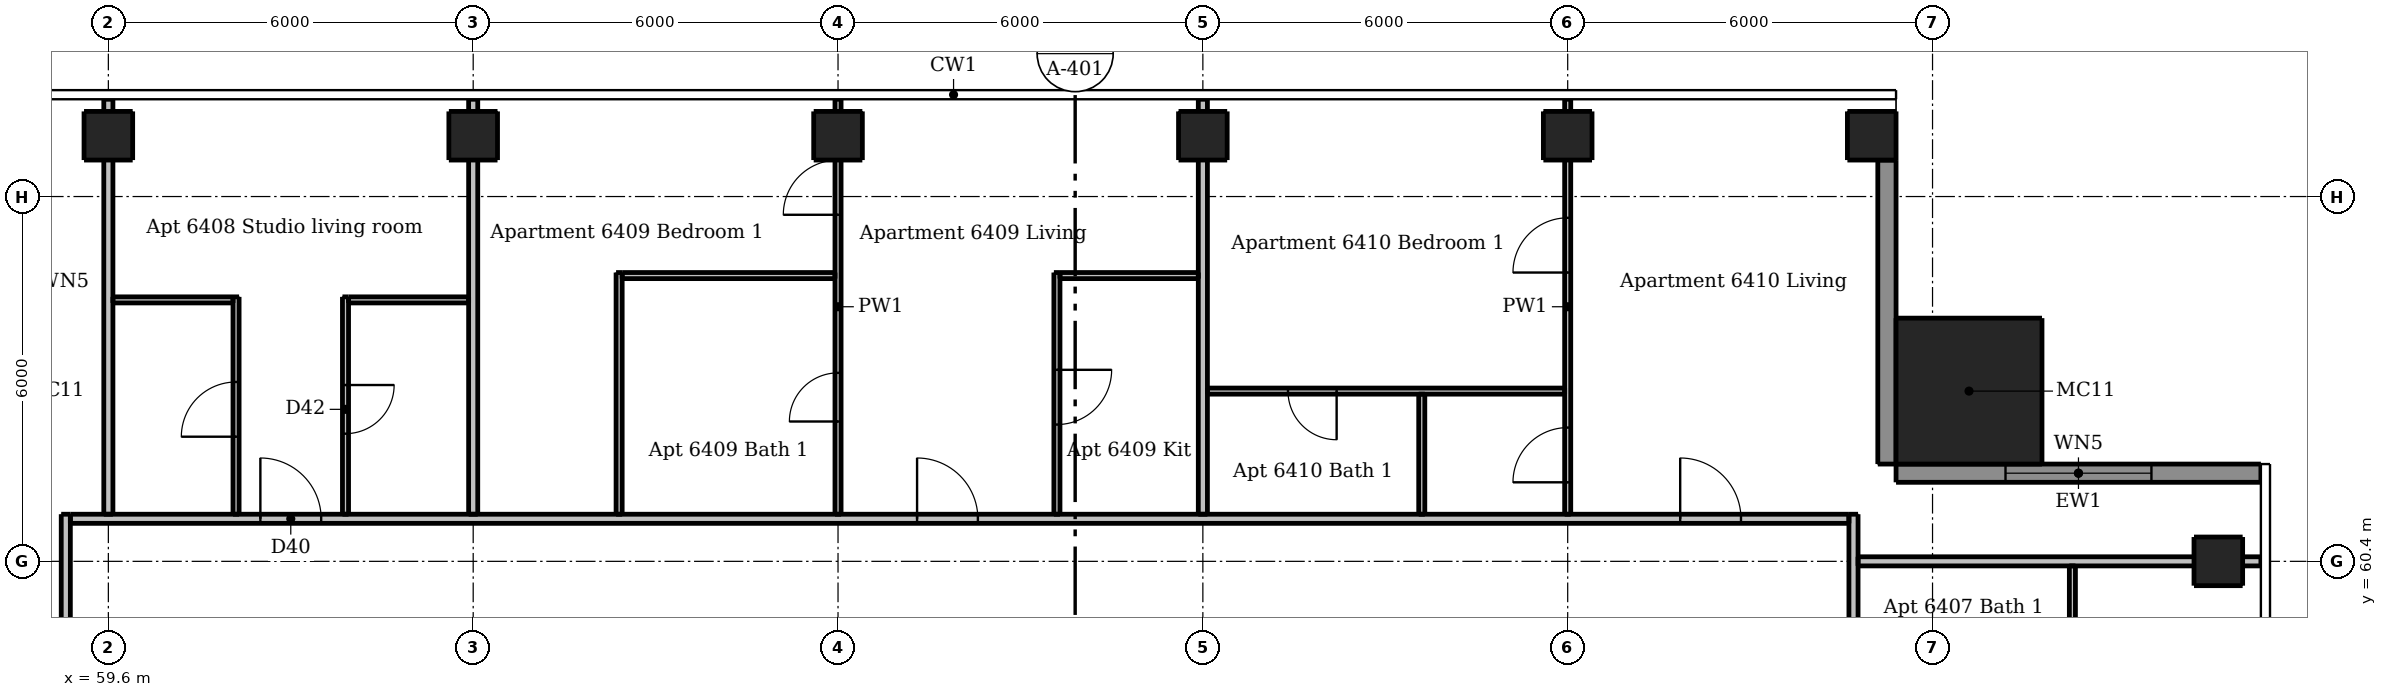
"""IFC4 building model, lengths in metres.
Left out: names, types, materials, properties, quantities, classifications, styles, units other than length and angle.
Written with IfcOpenShell. Run it as: python <this file> out.ifc"""

import sys

from ifc_helpers import new_model, si_unit, direction, frame, frame_2d, origin, origin_2d, place, context, subcontext, project, spatial, rectangle, extrude, element, fill, save


model = new_model("IFC4")
c1 = context("Model", 3, precision=1e-05, world=origin(), true_north=direction((0.0, 1.0)))
c2 = subcontext(c1, "Body", "Model", "MODEL_VIEW")
j1 = project(units=[si_unit("LENGTHUNIT", "METRE"), si_unit("PLANEANGLEUNIT", "RADIAN")], contexts=[c1])
p1 = place(None, origin())
s1 = spatial("IfcSite", under=j1, at=p1, CompositionType="ELEMENT")
p2 = place(p1, origin())
s2 = spatial("IfcBuilding", under=s1, at=p2, CompositionType="ELEMENT")
p3 = place(p2, frame((0.0, 0.0, 242.2)))
s3 = spatial("IfcBuildingStorey", under=s2, at=p3, CompositionType="ELEMENT", Elevation=242.2)
for number, where, z_axis, x_axis in (
    (1, (94.3, 60.4, 0.0), (0.0, 0.0, 1.0), (1.0, 0.0, 0.0)),
    (2, (59.6, 67.4, 0.0), (0.0, 0.0, 1.0), (1.0, 0.0, 0.0)),
    (3, (65.6, 67.4, 0.0), (0.0, 0.0, 1.0), (1.0, 0.0, 0.0)),
    (4, (71.6, 67.4, 0.0), (0.0, 0.0, 1.0), (1.0, 0.0, 0.0)),
    (5, (77.6, 67.4, 0.0), (0.0, 0.0, 1.0), (1.0, 0.0, 0.0)),
    (6, (83.6, 67.4, 0.0), (0.0, 0.0, 1.0), (1.0, 0.0, 0.0)),
    (7, (88.6, 67.4, 0.0), (0.0, 0.0, 1.0), (1.0, 0.0, 0.0)),
):
    element("IfcColumn", number, at=place(p3, frame(where, z_axis=z_axis, x_axis=x_axis)), inside=s3, PredefinedType="COLUMN", context=c2, shape_type="SweptSolid", body=[
        extrude(rectangle(XDim=0.8, YDim=0.8, at=origin_2d()), origin(), (0.0, 0.0, 1.0), 3.05),
    ])
p4 = place(p3, frame((90.2, 63.2, 0.0), z_axis=(0.0, 0.0, 1.0), x_axis=(1.0, 0.0, 0.0)))
e8 = element("IfcColumn", 8, at=p4, inside=s3, PredefinedType="COLUMN", context=c2, shape_type="SweptSolid", body=[
    extrude(rectangle(XDim=2.4, YDim=2.4, at=origin_2d()), origin(), (0.0, 0.0, 1.0), 3.3),
])
p5 = place(p3, frame((95.0, 61.85, 0.0), z_axis=(0.0, 0.0, 1.0), x_axis=(-1.0, 0.0, 0.0)))
e9 = element("IfcWall", 9, at=p5, inside=s3, PredefinedType="SOLIDWALL", context=c2, shape_type="SweptSolid", body=[
    extrude(rectangle(XDim=6.0, YDim=0.3, at=frame_2d((3.0, 0.0))), origin(), (0.0, 0.0, 1.0), 3.05),
])
p6 = place(p5, frame((1.8, 0.0, 0.15)))
e10 = element("IfcOpeningElement", 10, at=p6, cuts=e9, PredefinedType="OPENING", context=c2, shape_type="SweptSolid", body=[
    extrude(rectangle(XDim=2.4, YDim=2.1, at=frame_2d((1.2, 1.05))), frame((0.0, 0.16, 0.0), z_axis=(0.0, -1.0, 0.0), x_axis=(1.0, 0.0, 0.0)), (0.0, 0.0, 1.0), 0.32),
])
p7 = place(p3, frame((88.85, 62.0, 0.0), z_axis=(0.0, 0.0, 1.0), x_axis=(0.0, 1.0, 0.0)))
e11 = element("IfcWall", 11, at=p7, inside=s3, PredefinedType="SOLIDWALL", context=c2, shape_type="SweptSolid", body=[
    extrude(rectangle(XDim=5.0, YDim=0.3, at=frame_2d((2.5, 0.0))), origin(), (0.0, 0.0, 1.0), 3.05),
])
p8 = place(p3, frame((61.7, 61.175, 0.0), z_axis=(0.0, 0.0, 1.0), x_axis=(0.0, 1.0, 0.0)))
e12 = element("IfcWall", 12, at=p8, inside=s3, PredefinedType="PARTITIONING", context=c2, shape_type="SweptSolid", body=[
    extrude(rectangle(XDim=3.575, YDim=0.1, at=frame_2d((1.788, 0.0))), origin(), (0.0, 0.0, 1.0), 3.05),
])
p9 = place(p8, frame((1.275, 0.0, 0.0)))
e13 = element("IfcOpeningElement", 13, at=p9, cuts=e12, PredefinedType="OPENING", context=c2, shape_type="SweptSolid", body=[
    extrude(rectangle(XDim=0.9, YDim=2.1, at=frame_2d((0.45, 1.05))), frame((0.0, 0.06, 0.0), z_axis=(0.0, -1.0, 0.0), x_axis=(1.0, 0.0, 0.0)), (0.0, 0.0, 1.0), 0.12),
])
p10 = place(p3, frame((63.5, 64.75, 0.0), z_axis=(0.0, 0.0, 1.0), x_axis=(0.0, -1.0, 0.0)))
e14 = element("IfcWall", 14, at=p10, inside=s3, PredefinedType="PARTITIONING", context=c2, shape_type="SweptSolid", body=[
    extrude(rectangle(XDim=3.575, YDim=0.1, at=frame_2d((1.788, 0.0))), origin(), (0.0, 0.0, 1.0), 3.05),
])
p11 = place(p10, frame((1.45, 0.0, 0.0)))
e15 = element("IfcOpeningElement", 15, at=p11, cuts=e14, PredefinedType="OPENING", context=c2, shape_type="SweptSolid", body=[
    extrude(rectangle(XDim=0.8, YDim=2.1, at=frame_2d((0.4, 1.05))), frame((0.0, 0.06, 0.0), z_axis=(0.0, -1.0, 0.0), x_axis=(1.0, 0.0, 0.0)), (0.0, 0.0, 1.0), 0.12),
])
p12 = place(p3, frame((68.0, 61.175, 0.0), z_axis=(0.0, 0.0, 1.0), x_axis=(0.0, 1.0, 0.0)))
e16 = element("IfcWall", 16, at=p12, inside=s3, PredefinedType="PARTITIONING", context=c2, shape_type="SweptSolid", body=[
    extrude(rectangle(XDim=3.975, YDim=0.1, at=frame_2d((1.987, 0.0))), origin(), (0.0, 0.0, 1.0), 3.05),
])
p13 = place(p3, frame((71.6, 61.175, 0.0), z_axis=(0.0, 0.0, 1.0), x_axis=(0.0, 1.0, 0.0)))
e17 = element("IfcWall", 17, at=p13, inside=s3, PredefinedType="PARTITIONING", context=c2, shape_type="SweptSolid", body=[
    extrude(rectangle(XDim=6.825, YDim=0.1, at=frame_2d((3.413, 0.0))), origin(), (0.0, 0.0, 1.0), 2.516),
])
p14 = place(p13, frame((4.925, 0.0, 0.0)))
e18 = element("IfcOpeningElement", 18, at=p14, cuts=e17, PredefinedType="OPENING", context=c2, shape_type="SweptSolid", body=[
    extrude(rectangle(XDim=0.9, YDim=2.1, at=frame_2d((0.45, 1.05))), frame((0.0, 0.06, 0.0), z_axis=(0.0, -1.0, 0.0), x_axis=(1.0, 0.0, 0.0)), (0.0, 0.0, 1.0), 0.12),
])
p15 = place(p13, frame((1.525, 0.0, 0.0)))
e19 = element("IfcOpeningElement", 19, at=p15, cuts=e17, PredefinedType="OPENING", context=c2, shape_type="SweptSolid", body=[
    extrude(rectangle(XDim=0.8, YDim=2.1, at=frame_2d((0.4, 1.05))), frame((0.0, 0.06, 0.0), z_axis=(0.0, -1.0, 0.0), x_axis=(1.0, 0.0, 0.0)), (0.0, 0.0, 1.0), 0.12),
])
p16 = place(p3, frame((75.2, 65.15, 0.0), z_axis=(0.0, 0.0, 1.0), x_axis=(0.0, -1.0, 0.0)))
e20 = element("IfcWall", 20, at=p16, inside=s3, PredefinedType="PARTITIONING", context=c2, shape_type="SweptSolid", body=[
    extrude(rectangle(XDim=3.975, YDim=0.1, at=frame_2d((1.987, 0.0))), origin(), (0.0, 0.0, 1.0), 3.05),
])
p17 = place(p16, frame((1.6, 0.0, 0.0)))
e21 = element("IfcOpeningElement", 21, at=p17, cuts=e20, PredefinedType="OPENING", context=c2, shape_type="SweptSolid", body=[
    extrude(rectangle(XDim=0.9, YDim=2.1, at=frame_2d((0.45, 1.05))), frame((0.0, 0.06, 0.0), z_axis=(0.0, -1.0, 0.0), x_axis=(1.0, 0.0, 0.0)), (0.0, 0.0, 1.0), 0.12),
])
p18 = place(p3, frame((81.2, 61.175, 0.0), z_axis=(0.0, 0.0, 1.0), x_axis=(0.0, 1.0, 0.0)))
e22 = element("IfcWall", 22, at=p18, inside=s3, PredefinedType="PARTITIONING", context=c2, shape_type="SweptSolid", body=[
    extrude(rectangle(XDim=1.975, YDim=0.1, at=frame_2d((0.987, 0.0))), origin(), (0.0, 0.0, 1.0), 3.05),
])
p19 = place(p3, frame((83.6, 61.175, 0.0), z_axis=(0.0, 0.0, 1.0), x_axis=(0.0, 1.0, 0.0)))
e23 = element("IfcWall", 23, at=p19, inside=s3, PredefinedType="PARTITIONING", context=c2, shape_type="SweptSolid", body=[
    extrude(rectangle(XDim=6.825, YDim=0.1, at=frame_2d((3.413, 0.0))), origin(), (0.0, 0.0, 1.0), 2.516),
])
p20 = place(p19, frame((0.525, 0.0, 0.0)))
e24 = element("IfcOpeningElement", 24, at=p20, cuts=e23, PredefinedType="OPENING", context=c2, shape_type="SweptSolid", body=[
    extrude(rectangle(XDim=0.9, YDim=2.1, at=frame_2d((0.45, 1.05))), frame((0.0, 0.06, 0.0), z_axis=(0.0, -1.0, 0.0), x_axis=(1.0, 0.0, 0.0)), (0.0, 0.0, 1.0), 0.12),
])
p21 = place(p19, frame((3.975, 0.0, 0.0)))
e25 = element("IfcOpeningElement", 25, at=p21, cuts=e23, PredefinedType="OPENING", context=c2, shape_type="SweptSolid", body=[
    extrude(rectangle(XDim=0.9, YDim=2.1, at=frame_2d((0.45, 1.05))), frame((0.0, 0.06, 0.0), z_axis=(0.0, -1.0, 0.0), x_axis=(1.0, 0.0, 0.0)), (0.0, 0.0, 1.0), 0.12),
])
p22 = place(p3, frame((91.9, 58.25, 0.0), z_axis=(0.0, 0.0, 1.0), x_axis=(0.0, 1.0, 0.0)))
e26 = element("IfcWall", 26, at=p22, inside=s3, PredefinedType="PARTITIONING", context=c2, shape_type="SweptSolid", body=[
    extrude(rectangle(XDim=2.075, YDim=0.1, at=frame_2d((1.038, 0.0))), origin(), (0.0, 0.0, 1.0), 3.05),
])
p23 = place(p3, frame((68.05, 65.1, 0.0), z_axis=(0.0, 0.0, 1.0), x_axis=(1.0, 0.0, 0.0)))
e27 = element("IfcWall", 27, at=p23, inside=s3, PredefinedType="PARTITIONING", context=c2, shape_type="SweptSolid", body=[
    extrude(rectangle(XDim=3.5, YDim=0.1, at=frame_2d((1.75, 0.0))), origin(), (0.0, 0.0, 1.0), 3.05),
])
p24 = place(p3, frame((75.25, 65.1, 0.0), z_axis=(0.0, 0.0, 1.0), x_axis=(1.0, 0.0, 0.0)))
e28 = element("IfcWall", 28, at=p24, inside=s3, PredefinedType="PARTITIONING", context=c2, shape_type="SweptSolid", body=[
    extrude(rectangle(XDim=2.275, YDim=0.1, at=frame_2d((1.137, 0.0))), origin(), (0.0, 0.0, 1.0), 3.05),
])
for number, where, z_axis, x_axis in (
    (29, (59.675, 64.7, 0.0), (0.0, 0.0, 1.0), (1.0, 0.0, 0.0)),
    (30, (63.55, 64.7, 0.0), (0.0, 0.0, 1.0), (1.0, 0.0, 0.0)),
):
    element("IfcWall", number, at=place(p3, frame(where, z_axis=z_axis, x_axis=x_axis)), inside=s3, PredefinedType="PARTITIONING", context=c2, shape_type="SweptSolid", body=[
        extrude(rectangle(XDim=1.975, YDim=0.1, at=frame_2d((0.987, 0.0))), origin(), (0.0, 0.0, 1.0), 3.05),
    ])
p25 = place(p3, frame((83.55, 63.2, 0.0), z_axis=(0.0, 0.0, 1.0), x_axis=(-1.0, 0.0, 0.0)))
e31 = element("IfcWall", 31, at=p25, inside=s3, PredefinedType="PARTITIONING", context=c2, shape_type="SweptSolid", body=[
    extrude(rectangle(XDim=5.875, YDim=0.1, at=frame_2d((2.938, 0.0))), origin(), (0.0, 0.0, 1.0), 3.05),
])
p26 = place(p25, frame((3.75, 0.0, 0.0)))
e32 = element("IfcOpeningElement", 32, at=p26, cuts=e31, PredefinedType="OPENING", context=c2, shape_type="SweptSolid", body=[
    extrude(rectangle(XDim=0.8, YDim=2.1, at=frame_2d((0.4, 1.05))), frame((0.0, 0.06, 0.0), z_axis=(0.0, -1.0, 0.0), x_axis=(1.0, 0.0, 0.0)), (0.0, 0.0, 1.0), 0.12),
])
p27 = place(p3, frame((58.9, 30.325, 0.0), z_axis=(0.0, 0.0, 1.0), x_axis=(0.0, 1.0, 0.0)))
e33 = element("IfcWall", 33, at=p27, inside=s3, PredefinedType="PARTITIONING", context=c2, shape_type="SweptSolid", body=[
    extrude(rectangle(XDim=30.85, YDim=0.15, at=frame_2d((15.425, 0.0))), origin(), (0.0, 0.0, 1.0), 3.05),
])
p28 = place(p27, frame((2.575, 0.0, 0.0)))
e34 = element("IfcOpeningElement", 34, at=p28, cuts=e33, PredefinedType="OPENING", context=c2, shape_type="SweptSolid", body=[
    extrude(rectangle(XDim=1.0, YDim=2.1, at=frame_2d((0.5, 1.05))), frame((0.0, 0.085, 0.0), z_axis=(0.0, -1.0, 0.0), x_axis=(1.0, 0.0, 0.0)), (0.0, 0.0, 1.0), 0.17),
])
p29 = place(p27, frame((8.575, 0.0, 0.0)))
e35 = element("IfcOpeningElement", 35, at=p29, cuts=e33, PredefinedType="OPENING", context=c2, shape_type="SweptSolid", body=[
    extrude(rectangle(XDim=1.0, YDim=2.1, at=frame_2d((0.5, 1.05))), frame((0.0, 0.085, 0.0), z_axis=(0.0, -1.0, 0.0), x_axis=(1.0, 0.0, 0.0)), (0.0, 0.0, 1.0), 0.17),
])
p30 = place(p27, frame((14.575, 0.0, 0.0)))
e36 = element("IfcOpeningElement", 36, at=p30, cuts=e33, PredefinedType="OPENING", context=c2, shape_type="SweptSolid", body=[
    extrude(rectangle(XDim=1.0, YDim=2.1, at=frame_2d((0.5, 1.05))), frame((0.0, 0.085, 0.0), z_axis=(0.0, -1.0, 0.0), x_axis=(1.0, 0.0, 0.0)), (0.0, 0.0, 1.0), 0.17),
])
p31 = place(p27, frame((26.925, 0.0, 0.0)))
e37 = element("IfcOpeningElement", 37, at=p31, cuts=e33, PredefinedType="OPENING", context=c2, shape_type="SweptSolid", body=[
    extrude(rectangle(XDim=1.0, YDim=2.1, at=frame_2d((0.5, 1.05))), frame((0.0, 0.085, 0.0), z_axis=(0.0, -1.0, 0.0), x_axis=(1.0, 0.0, 0.0)), (0.0, 0.0, 1.0), 0.17),
])
p32 = place(p3, frame((59.6, 61.175, 0.0), z_axis=(0.0, 0.0, 1.0), x_axis=(0.0, 1.0, 0.0)))
e38 = element("IfcWall", 38, at=p32, inside=s3, PredefinedType="PARTITIONING", context=c2, shape_type="SweptSolid", body=[
    extrude(rectangle(XDim=6.825, YDim=0.15, at=frame_2d((3.413, 0.0))), origin(), (0.0, 0.0, 1.0), 2.51),
])
for number, where, z_axis, x_axis in (
    (39, (65.6, 61.175, 0.0), (0.0, 0.0, 1.0), (0.0, 1.0, 0.0)),
    (40, (77.6, 61.175, 0.0), (0.0, 0.0, 1.0), (0.0, 1.0, 0.0)),
):
    element("IfcWall", number, at=place(p3, frame(where, z_axis=z_axis, x_axis=x_axis)), inside=s3, PredefinedType="PARTITIONING", context=c2, shape_type="SweptSolid", body=[
        extrude(rectangle(XDim=6.825, YDim=0.15, at=frame_2d((3.413, 0.0))), origin(), (0.0, 0.0, 1.0), 2.516),
    ])
p33 = place(p3, frame((88.3, 61.175, 0.0), z_axis=(0.0, 0.0, 1.0), x_axis=(0.0, -1.0, 0.0)))
e41 = element("IfcWall", 41, at=p33, inside=s3, PredefinedType="PARTITIONING", context=c2, shape_type="SweptSolid", body=[
    extrude(rectangle(XDim=29.4, YDim=0.15, at=frame_2d((14.7, 0.0))), origin(), (0.0, 0.0, 1.0), 3.05),
])
p34 = place(p33, frame((26.625, 0.0, 0.0)))
e42 = element("IfcOpeningElement", 42, at=p34, cuts=e41, PredefinedType="OPENING", context=c2, shape_type="SweptSolid", body=[
    extrude(rectangle(XDim=1.0, YDim=2.1, at=frame_2d((0.5, 1.05))), frame((0.0, 0.085, 0.0), z_axis=(0.0, -1.0, 0.0), x_axis=(1.0, 0.0, 0.0)), (0.0, 0.0, 1.0), 0.17),
])
p35 = place(p33, frame((15.275, 0.0, 0.0)))
e43 = element("IfcOpeningElement", 43, at=p35, cuts=e41, PredefinedType="OPENING", context=c2, shape_type="SweptSolid", body=[
    extrude(rectangle(XDim=1.0, YDim=2.1, at=frame_2d((0.5, 1.05))), frame((0.0, 0.085, 0.0), z_axis=(0.0, -1.0, 0.0), x_axis=(1.0, 0.0, 0.0)), (0.0, 0.0, 1.0), 0.17),
])
p36 = place(p33, frame((9.275, 0.0, 0.0)))
e44 = element("IfcOpeningElement", 44, at=p36, cuts=e41, PredefinedType="OPENING", context=c2, shape_type="SweptSolid", body=[
    extrude(rectangle(XDim=1.0, YDim=2.1, at=frame_2d((0.5, 1.05))), frame((0.0, 0.085, 0.0), z_axis=(0.0, -1.0, 0.0), x_axis=(1.0, 0.0, 0.0)), (0.0, 0.0, 1.0), 0.17),
])
p37 = place(p33, frame((3.275, 0.0, 0.0)))
e45 = element("IfcOpeningElement", 45, at=p37, cuts=e41, PredefinedType="OPENING", context=c2, shape_type="SweptSolid", body=[
    extrude(rectangle(XDim=1.0, YDim=2.1, at=frame_2d((0.5, 1.05))), frame((0.0, 0.085, 0.0), z_axis=(0.0, -1.0, 0.0), x_axis=(1.0, 0.0, 0.0)), (0.0, 0.0, 1.0), 0.17),
])
p38 = place(p3, frame((58.975, 61.1, 0.0), z_axis=(0.0, 0.0, 1.0), x_axis=(1.0, 0.0, 0.0)))
e46 = element("IfcWall", 46, at=p38, inside=s3, PredefinedType="PARTITIONING", context=c2, shape_type="SweptSolid", body=[
    extrude(rectangle(XDim=29.25, YDim=0.15, at=frame_2d((14.625, 0.0))), origin(), (0.0, 0.0, 1.0), 3.05),
])
p39 = place(p38, frame((3.125, 0.0, 0.0)))
e47 = element("IfcOpeningElement", 47, at=p39, cuts=e46, PredefinedType="OPENING", context=c2, shape_type="SweptSolid", body=[
    extrude(rectangle(XDim=1.0, YDim=2.1, at=frame_2d((0.5, 1.05))), frame((0.0, 0.085, 0.0), z_axis=(0.0, -1.0, 0.0), x_axis=(1.0, 0.0, 0.0)), (0.0, 0.0, 1.0), 0.17),
])
p40 = place(p38, frame((13.925, 0.0, 0.0)))
e48 = element("IfcOpeningElement", 48, at=p40, cuts=e46, PredefinedType="OPENING", context=c2, shape_type="SweptSolid", body=[
    extrude(rectangle(XDim=1.0, YDim=2.1, at=frame_2d((0.5, 1.05))), frame((0.0, 0.085, 0.0), z_axis=(0.0, -1.0, 0.0), x_axis=(1.0, 0.0, 0.0)), (0.0, 0.0, 1.0), 0.17),
])
p41 = place(p38, frame((26.475, 0.0, 0.0)))
e49 = element("IfcOpeningElement", 49, at=p41, cuts=e46, PredefinedType="OPENING", context=c2, shape_type="SweptSolid", body=[
    extrude(rectangle(XDim=1.0, YDim=2.1, at=frame_2d((0.5, 1.05))), frame((0.0, 0.085, 0.0), z_axis=(0.0, -1.0, 0.0), x_axis=(1.0, 0.0, 0.0)), (0.0, 0.0, 1.0), 0.17),
])
p42 = place(p3, frame((88.375, 60.4, 0.0), z_axis=(0.0, 0.0, 1.0), x_axis=(1.0, 0.0, 0.0)))
e50 = element("IfcWall", 50, at=p42, inside=s3, PredefinedType="PARTITIONING", context=c2, shape_type="SweptSolid", body=[
    extrude(rectangle(XDim=6.625, YDim=0.15, at=frame_2d((3.312, 0.0))), origin(), (0.0, 0.0, 1.0), 2.647),
])
p43 = place(p6, origin())
e51 = element("IfcWindow", 51, at=p43, inside=s3, PartitioningType="DOUBLE_PANEL_VERTICAL", PredefinedType="WINDOW", context=c2, shape_type="SweptSolid", body=[
    extrude(rectangle(XDim=2.4, YDim=2.1, at=frame_2d((1.2, 1.05))), frame((0.0, 0.03, 0.0), z_axis=(0.0, -1.0, 0.0), x_axis=(1.0, 0.0, 0.0)), (0.0, 0.0, 1.0), 0.06),
])
fill(e10, e51)
p44 = place(p39, origin())
e52 = element("IfcDoor", 52, at=p44, inside=s3, OperationType="SINGLE_SWING_LEFT", PredefinedType="DOOR", context=c2, shape_type="SweptSolid", body=[
    extrude(rectangle(XDim=1.0, YDim=2.1, at=frame_2d((0.5, 1.05))), frame((0.0, 0.025, 0.0), z_axis=(0.0, -1.0, 0.0), x_axis=(1.0, 0.0, 0.0)), (0.0, 0.0, 1.0), 0.05),
])
fill(e47, e52)
p45 = place(p9, origin())
e53 = element("IfcDoor", 53, at=p45, inside=s3, OperationType="SINGLE_SWING_LEFT", PredefinedType="DOOR", context=c2, shape_type="SweptSolid", body=[
    extrude(rectangle(XDim=0.9, YDim=2.1, at=frame_2d((0.45, 1.05))), frame((0.0, 0.025, 0.0), z_axis=(0.0, -1.0, 0.0), x_axis=(1.0, 0.0, 0.0)), (0.0, 0.0, 1.0), 0.05),
])
fill(e13, e53)
p46 = place(p11, origin())
e54 = element("IfcDoor", 54, at=p46, inside=s3, OperationType="SINGLE_SWING_LEFT", PredefinedType="DOOR", context=c2, shape_type="SweptSolid", body=[
    extrude(rectangle(XDim=0.8, YDim=2.1, at=frame_2d((0.4, 1.05))), frame((0.0, 0.025, 0.0), z_axis=(0.0, -1.0, 0.0), x_axis=(1.0, 0.0, 0.0)), (0.0, 0.0, 1.0), 0.05),
])
fill(e15, e54)
p47 = place(p40, origin())
e55 = element("IfcDoor", 55, at=p47, inside=s3, OperationType="SINGLE_SWING_LEFT", PredefinedType="DOOR", context=c2, shape_type="SweptSolid", body=[
    extrude(rectangle(XDim=1.0, YDim=2.1, at=frame_2d((0.5, 1.05))), frame((0.0, 0.025, 0.0), z_axis=(0.0, -1.0, 0.0), x_axis=(1.0, 0.0, 0.0)), (0.0, 0.0, 1.0), 0.05),
])
fill(e48, e55)
p48 = place(p17, origin())
e56 = element("IfcDoor", 56, at=p48, inside=s3, OperationType="SINGLE_SWING_LEFT", PredefinedType="DOOR", context=c2, shape_type="SweptSolid", body=[
    extrude(rectangle(XDim=0.9, YDim=2.1, at=frame_2d((0.45, 1.05))), frame((0.0, 0.025, 0.0), z_axis=(0.0, -1.0, 0.0), x_axis=(1.0, 0.0, 0.0)), (0.0, 0.0, 1.0), 0.05),
])
fill(e21, e56)
p49 = place(p14, origin())
e57 = element("IfcDoor", 57, at=p49, inside=s3, OperationType="SINGLE_SWING_LEFT", PredefinedType="DOOR", context=c2, shape_type="SweptSolid", body=[
    extrude(rectangle(XDim=0.9, YDim=2.1, at=frame_2d((0.45, 1.05))), frame((0.0, 0.025, 0.0), z_axis=(0.0, -1.0, 0.0), x_axis=(1.0, 0.0, 0.0)), (0.0, 0.0, 1.0), 0.05),
])
fill(e18, e57)
p50 = place(p15, origin())
e58 = element("IfcDoor", 58, at=p50, inside=s3, OperationType="SINGLE_SWING_LEFT", PredefinedType="DOOR", context=c2, shape_type="SweptSolid", body=[
    extrude(rectangle(XDim=0.8, YDim=2.1, at=frame_2d((0.4, 1.05))), frame((0.0, 0.025, 0.0), z_axis=(0.0, -1.0, 0.0), x_axis=(1.0, 0.0, 0.0)), (0.0, 0.0, 1.0), 0.05),
])
fill(e19, e58)
p51 = place(p41, origin())
e59 = element("IfcDoor", 59, at=p51, inside=s3, OperationType="SINGLE_SWING_LEFT", PredefinedType="DOOR", context=c2, shape_type="SweptSolid", body=[
    extrude(rectangle(XDim=1.0, YDim=2.1, at=frame_2d((0.5, 1.05))), frame((0.0, 0.025, 0.0), z_axis=(0.0, -1.0, 0.0), x_axis=(1.0, 0.0, 0.0)), (0.0, 0.0, 1.0), 0.05),
])
fill(e49, e59)
p52 = place(p20, origin())
e60 = element("IfcDoor", 60, at=p52, inside=s3, OperationType="SINGLE_SWING_LEFT", PredefinedType="DOOR", context=c2, shape_type="SweptSolid", body=[
    extrude(rectangle(XDim=0.9, YDim=2.1, at=frame_2d((0.45, 1.05))), frame((0.0, 0.025, 0.0), z_axis=(0.0, -1.0, 0.0), x_axis=(1.0, 0.0, 0.0)), (0.0, 0.0, 1.0), 0.05),
])
fill(e24, e60)
p53 = place(p21, origin())
e61 = element("IfcDoor", 61, at=p53, inside=s3, OperationType="SINGLE_SWING_LEFT", PredefinedType="DOOR", context=c2, shape_type="SweptSolid", body=[
    extrude(rectangle(XDim=0.9, YDim=2.1, at=frame_2d((0.45, 1.05))), frame((0.0, 0.025, 0.0), z_axis=(0.0, -1.0, 0.0), x_axis=(1.0, 0.0, 0.0)), (0.0, 0.0, 1.0), 0.05),
])
fill(e25, e61)
p54 = place(p26, origin())
e62 = element("IfcDoor", 62, at=p54, inside=s3, OperationType="SINGLE_SWING_LEFT", PredefinedType="DOOR", context=c2, shape_type="SweptSolid", body=[
    extrude(rectangle(XDim=0.8, YDim=2.1, at=frame_2d((0.4, 1.05))), frame((0.0, 0.025, 0.0), z_axis=(0.0, -1.0, 0.0), x_axis=(1.0, 0.0, 0.0)), (0.0, 0.0, 1.0), 0.05),
])
fill(e32, e62)
save(model, sys.argv[1])
